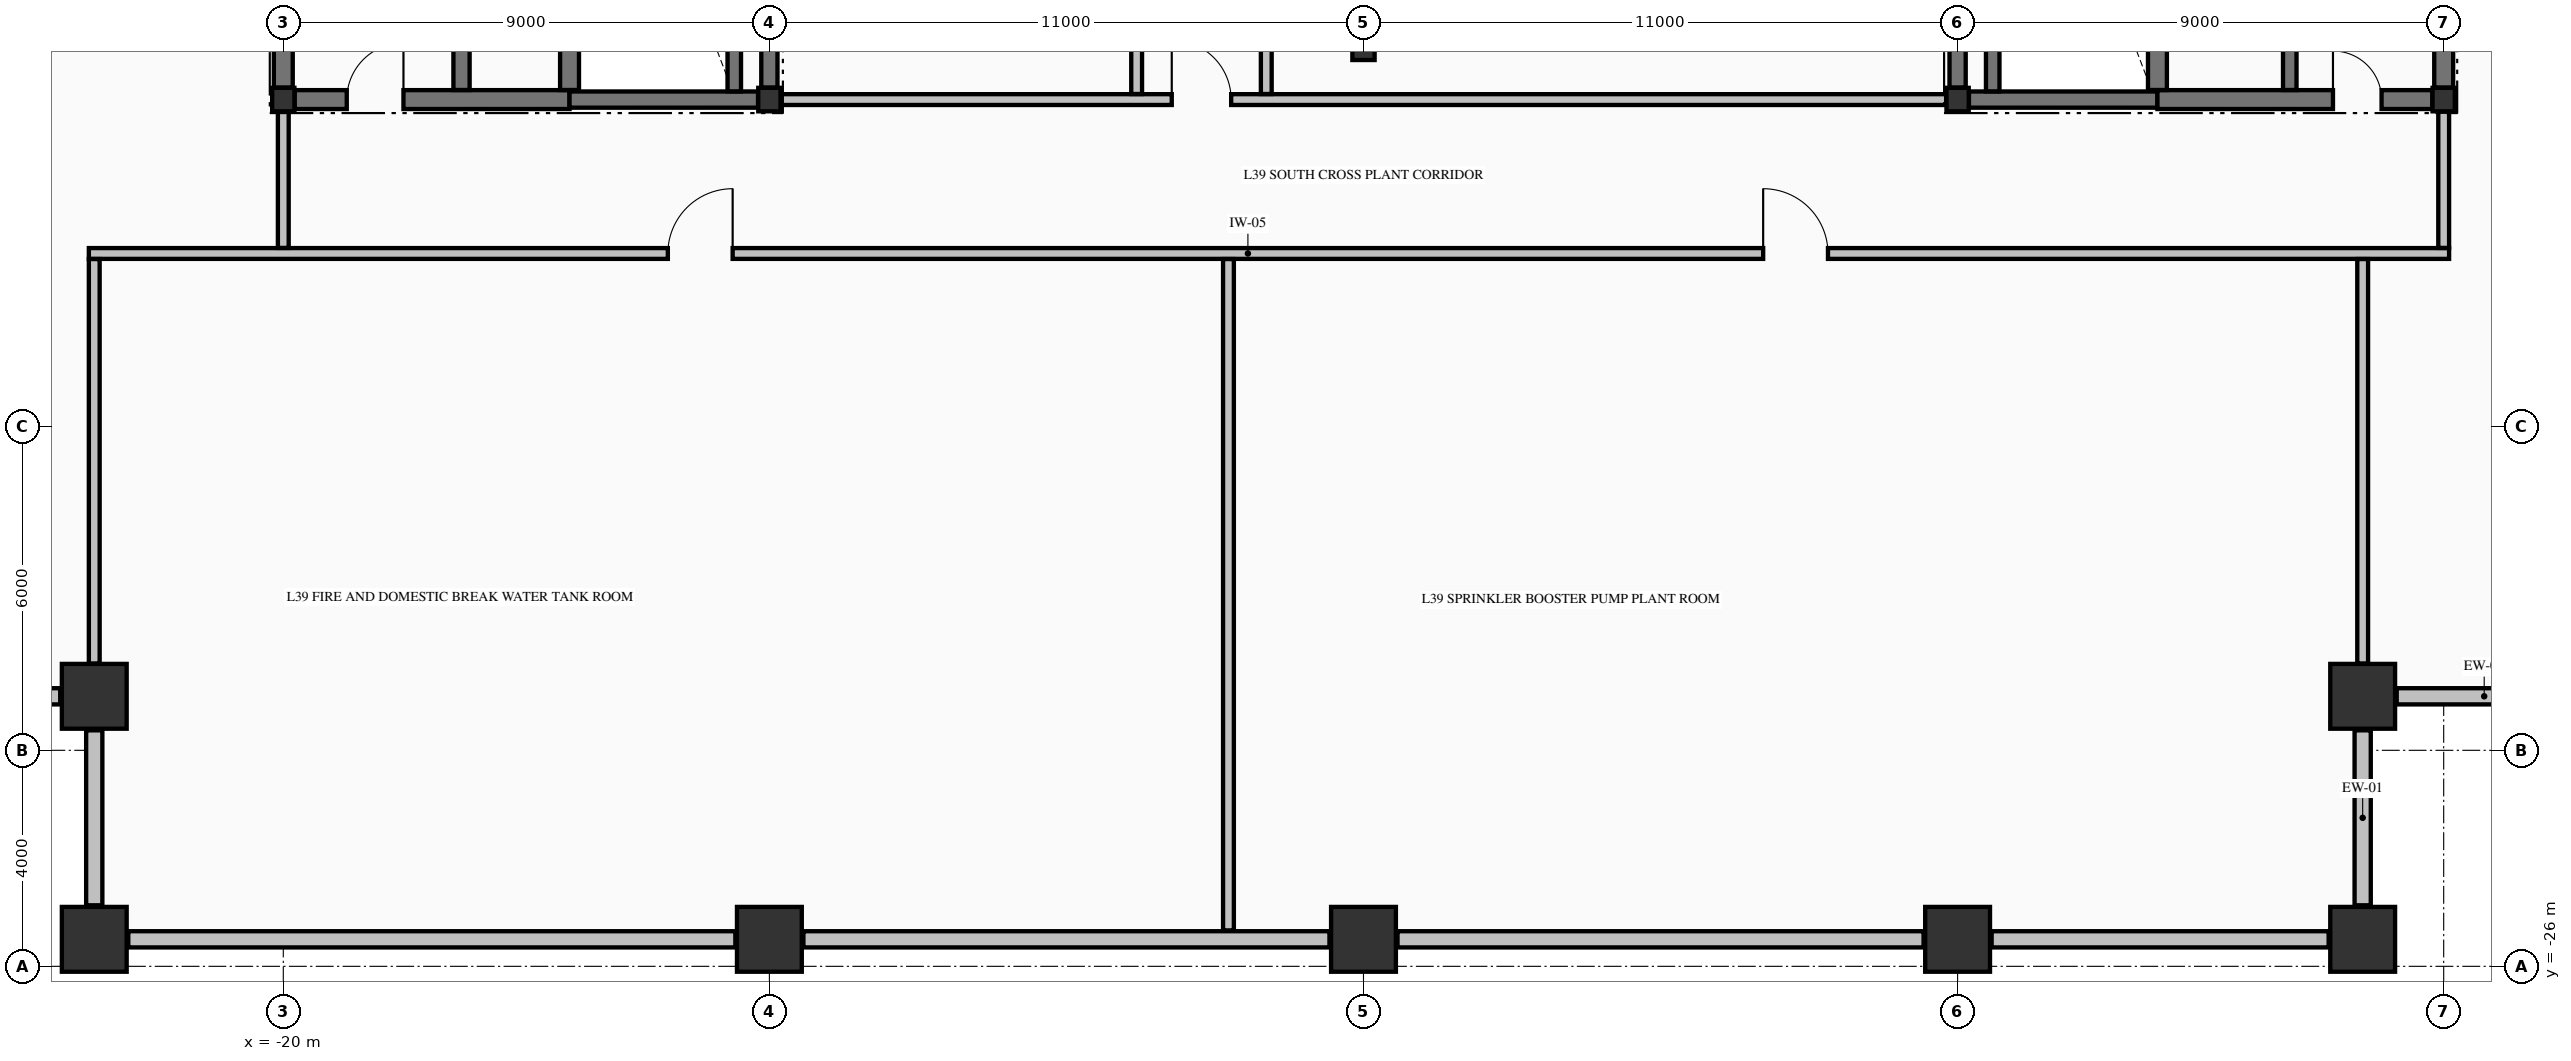
"""IFC4 building model, lengths in metres.
Left out: names, types, materials, properties, quantities, classifications, styles, units other than length and angle.
Written with IfcOpenShell. Run it as: python <this file> out.ifc"""

import sys

from ifc_helpers import new_model, si_unit, direction, frame, frame_2d, origin, origin_2d, place, context, subcontext, project, spatial, rectangle, i_section, extrude, element, fill, save


model = new_model("IFC4")
c1 = context("Model", 3, precision=1e-05, world=origin(), true_north=direction((0.0, 1.0)))
c2 = subcontext(c1, "Body", "Model", "MODEL_VIEW")
j1 = project(units=[si_unit("LENGTHUNIT", "METRE"), si_unit("PLANEANGLEUNIT", "RADIAN")], contexts=[c1])
p1 = place(None, origin())
s1 = spatial("IfcSite", under=j1, at=p1, CompositionType="ELEMENT")
p2 = place(p1, origin())
s2 = spatial("IfcBuilding", under=s1, at=p2, CompositionType="ELEMENT")
p3 = place(p2, frame((0.0, 0.0, 153.48)))
s3 = spatial("IfcBuildingStorey", under=s2, at=p3, CompositionType="ELEMENT", Elevation=153.48)
for number, where, z_axis, x_axis in (
    (1, (-23.5, -25.5, -0.425), (0.0, 0.0, 1.0), (1.0, 0.0, 0.0)),
    (2, (-11.0, -25.5, -0.425), (0.0, 0.0, 1.0), (1.0, 0.0, 0.0)),
    (3, (0.0, -25.5, -0.425), (0.0, 0.0, 1.0), (1.0, 0.0, 0.0)),
    (4, (11.0, -25.5, -0.425), (0.0, 0.0, 1.0), (1.0, 0.0, 0.0)),
    (5, (18.5, -25.5, -0.425), (0.0, 0.0, 1.0), (1.0, 0.0, 0.0)),
    (6, (-23.5, -21.0, -0.425), (0.0, 0.0, 1.0), (1.0, 0.0, 0.0)),
    (7, (18.5, -21.0, -0.425), (0.0, 0.0, 1.0), (1.0, 0.0, 0.0)),
):
    element("IfcColumn", number, at=place(p3, frame(where, z_axis=z_axis, x_axis=x_axis)), inside=s3, PredefinedType="COLUMN", context=c2, shape_type="SweptSolid", body=[
        extrude(rectangle(XDim=1.2, YDim=1.2, at=origin_2d()), origin(), (0.0, 0.0, 1.0), 4.76),
    ])
for number, where, z_axis, x_axis in (
    (8, (-20.0, -9.95, -0.425), (0.0, 0.0, 1.0), (1.0, 0.0, 0.0)),
    (9, (-11.0, -9.95, -0.425), (0.0, 0.0, 1.0), (1.0, 0.0, 0.0)),
    (10, (11.0, -9.95, -0.425), (0.0, 0.0, 1.0), (1.0, 0.0, 0.0)),
    (11, (20.0, -9.95, -0.425), (0.0, 0.0, 1.0), (1.0, 0.0, 0.0)),
    (12, (0.0, -9.0, -0.425), (0.0, 0.0, 1.0), (1.0, 0.0, 0.0)),
):
    element("IfcColumn", number, at=place(p3, frame(where, z_axis=z_axis, x_axis=x_axis)), inside=s3, PredefinedType="COLUMN", context=c2, shape_type="SweptSolid", body=[
        extrude(i_section(OverallWidth=0.412, OverallDepth=0.435, WebThickness=0.036, FlangeThickness=0.058, FilletRadius=0.015, at=origin_2d()), origin(), (0.0, 0.0, 1.0), 4.76),
    ])
p4 = place(p3, frame((18.5, -24.87, 0.0), z_axis=(0.0, 0.0, 1.0), x_axis=(0.0, 1.0, 0.0)))
e13 = element("IfcWall", 13, at=p4, inside=s3, PredefinedType="STANDARD", context=c2, shape_type="SweptSolid", body=[
    extrude(rectangle(XDim=3.24, YDim=0.3, at=frame_2d((1.62, 0.0))), origin(), (0.0, 0.0, 1.0), 2.527),
])
for number, where, z_axis, x_axis in (
    (14, (19.13, -21.0, 0.0), (0.0, 0.0, 1.0), (1.0, 0.0, 0.0)),
    (15, (-27.37, -21.0, 0.0), (0.0, 0.0, 1.0), (1.0, 0.0, 0.0)),
):
    element("IfcWall", number, at=place(p3, frame(where, z_axis=z_axis, x_axis=x_axis)), inside=s3, PredefinedType="STANDARD", context=c2, shape_type="SweptSolid", body=[
        extrude(rectangle(XDim=3.24, YDim=0.3, at=frame_2d((1.62, 0.0))), origin(), (0.0, 0.0, 1.0), 1.927),
    ])
p5 = place(p3, frame((-23.5, -21.63, 0.0), z_axis=(0.0, 0.0, 1.0), x_axis=(0.0, -1.0, 0.0)))
e16 = element("IfcWall", 16, at=p5, inside=s3, PredefinedType="STANDARD", context=c2, shape_type="SweptSolid", body=[
    extrude(rectangle(XDim=3.24, YDim=0.3, at=frame_2d((1.62, 0.0))), origin(), (0.0, 0.0, 1.0), 2.527),
])
p6 = place(p3, frame((-22.87, -25.5, 0.0), z_axis=(0.0, 0.0, 1.0), x_axis=(1.0, 0.0, 0.0)))
e17 = element("IfcWall", 17, at=p6, inside=s3, PredefinedType="STANDARD", context=c2, shape_type="SweptSolid", body=[
    extrude(rectangle(XDim=11.24, YDim=0.3, at=frame_2d((5.62, 0.0))), origin(), (0.0, 0.0, 1.0), 1.927),
])
for number, where, z_axis, x_axis in (
    (18, (-10.37, -25.5, 0.0), (0.0, 0.0, 1.0), (1.0, 0.0, 0.0)),
    (19, (0.63, -25.5, 0.0), (0.0, 0.0, 1.0), (1.0, 0.0, 0.0)),
):
    element("IfcWall", number, at=place(p3, frame(where, z_axis=z_axis, x_axis=x_axis)), inside=s3, PredefinedType="STANDARD", context=c2, shape_type="SweptSolid", body=[
        extrude(rectangle(XDim=9.74, YDim=0.3, at=frame_2d((4.87, 0.0))), origin(), (0.0, 0.0, 1.0), 1.927),
    ])
p7 = place(p3, frame((11.63, -25.5, 0.0), z_axis=(0.0, 0.0, 1.0), x_axis=(1.0, 0.0, 0.0)))
e20 = element("IfcWall", 20, at=p7, inside=s3, PredefinedType="STANDARD", context=c2, shape_type="SweptSolid", body=[
    extrude(rectangle(XDim=6.24, YDim=0.3, at=frame_2d((3.12, 0.0))), origin(), (0.0, 0.0, 1.0), 1.927),
])
p8 = place(p3, frame((-19.79, -9.95, 0.0), z_axis=(0.0, 0.0, 1.0), x_axis=(1.0, 0.0, 0.0)))
e21 = element("IfcWall", 21, at=p8, inside=s3, PredefinedType="SHEAR", context=c2, shape_type="SweptSolid", body=[
    extrude(rectangle(XDim=5.09, YDim=0.35, at=frame_2d((2.545, 0.0))), origin(), (0.0, 0.0, 1.0), 4.335),
])
p9 = place(p8, frame((0.965, 0.0, 0.0)))
e22 = element("IfcOpeningElement", 22, at=p9, cuts=e21, PredefinedType="OPENING", context=c2, shape_type="SweptSolid", body=[
    extrude(rectangle(XDim=1.05, YDim=2.15, at=frame_2d((0.525, 1.075))), frame((0.0, 0.185, 0.0), z_axis=(0.0, -1.0, 0.0), x_axis=(1.0, 0.0, 0.0)), (0.0, 0.0, 1.0), 0.37),
])
for number, where, z_axis, x_axis in (
    (23, (-14.7, -9.95, 0.0), (0.0, 0.0, 1.0), (1.0, 0.0, 0.0)),
    (24, (11.21, -9.95, 0.0), (0.0, 0.0, 1.0), (1.0, 0.0, 0.0)),
):
    element("IfcWall", number, at=place(p3, frame(where, z_axis=z_axis, x_axis=x_axis)), inside=s3, PredefinedType="SHEAR", context=c2, shape_type="SweptSolid", body=[
        extrude(rectangle(XDim=3.49, YDim=0.3, at=frame_2d((1.745, 0.0))), origin(), (0.0, 0.0, 1.0), 4.335),
    ])
p10 = place(p3, frame((14.7, -9.95, 0.0), z_axis=(0.0, 0.0, 1.0), x_axis=(1.0, 0.0, 0.0)))
e25 = element("IfcWall", 25, at=p10, inside=s3, PredefinedType="SHEAR", context=c2, shape_type="SweptSolid", body=[
    extrude(rectangle(XDim=5.09, YDim=0.35, at=frame_2d((2.545, 0.0))), origin(), (0.0, 0.0, 1.0), 4.335),
])
p11 = place(p10, frame((3.25, 0.0, 0.0)))
e26 = element("IfcOpeningElement", 26, at=p11, cuts=e25, PredefinedType="OPENING", context=c2, shape_type="SweptSolid", body=[
    extrude(rectangle(XDim=0.9, YDim=2.15, at=frame_2d((0.45, 1.075))), frame((0.0, 0.185, 0.0), z_axis=(0.0, -1.0, 0.0), x_axis=(1.0, 0.0, 0.0)), (0.0, 0.0, 1.0), 0.37),
])
p12 = place(p3, frame((-23.6, -12.8, 0.0), z_axis=(0.0, 0.0, 1.0), x_axis=(1.0, 0.0, 0.0)))
e27 = element("IfcWall", 27, at=p12, inside=s3, PredefinedType="PARTITIONING", context=c2, shape_type="SweptSolid", body=[
    extrude(rectangle(XDim=43.7, YDim=0.2, at=frame_2d((21.85, 0.0))), origin(), (0.0, 0.0, 1.0), 4.335),
])
p13 = place(p12, frame((10.72, 0.0, 0.0)))
e28 = element("IfcOpeningElement", 28, at=p13, cuts=e27, PredefinedType="OPENING", context=c2, shape_type="SweptSolid", body=[
    extrude(rectangle(XDim=1.2, YDim=2.15, at=frame_2d((0.6, 1.075))), frame((0.0, 0.11, 0.0), z_axis=(0.0, -1.0, 0.0), x_axis=(1.0, 0.0, 0.0)), (0.0, 0.0, 1.0), 0.22),
])
p14 = place(p12, frame((31.0, 0.0, 0.0)))
e29 = element("IfcOpeningElement", 29, at=p14, cuts=e27, PredefinedType="OPENING", context=c2, shape_type="SweptSolid", body=[
    extrude(rectangle(XDim=1.2, YDim=2.15, at=frame_2d((0.6, 1.075))), frame((0.0, 0.11, 0.0), z_axis=(0.0, -1.0, 0.0), x_axis=(1.0, 0.0, 0.0)), (0.0, 0.0, 1.0), 0.22),
])
p15 = place(p3, frame((-10.788, -9.95, 0.0), z_axis=(0.0, 0.0, 1.0), x_axis=(1.0, 0.0, 0.0)))
e30 = element("IfcWall", 30, at=p15, inside=s3, PredefinedType="PARTITIONING", context=c2, shape_type="SweptSolid", body=[
    extrude(rectangle(XDim=21.576, YDim=0.2, at=frame_2d((10.788, 0.0))), origin(), (0.0, 0.0, 1.0), 4.335),
])
p16 = place(p15, frame((7.238, 0.0, 0.0)))
e31 = element("IfcOpeningElement", 31, at=p16, cuts=e30, PredefinedType="OPENING", context=c2, shape_type="SweptSolid", body=[
    extrude(rectangle(XDim=1.1, YDim=2.15, at=frame_2d((0.55, 1.075))), frame((0.0, 0.11, 0.0), z_axis=(0.0, -1.0, 0.0), x_axis=(1.0, 0.0, 0.0)), (0.0, 0.0, 1.0), 0.22),
])
p17 = place(p3, frame((-20.0, -9.729, 0.0), z_axis=(0.0, 0.0, 1.0), x_axis=(0.0, 1.0, 0.0)))
e32 = element("IfcWall", 32, at=p17, inside=s3, PredefinedType="SHEAR", context=c2, shape_type="SweptSolid", body=[
    extrude(rectangle(XDim=9.507, YDim=0.35, at=frame_2d((4.753, 0.0))), origin(), (0.0, 0.0, 1.0), 4.335),
])
p18 = place(p3, frame((-16.7, -9.773, 0.0), z_axis=(0.0, 0.0, 1.0), x_axis=(0.0, 1.0, 0.0)))
e33 = element("IfcWall", 33, at=p18, inside=s3, PredefinedType="SHEAR", context=c2, shape_type="SweptSolid", body=[
    extrude(rectangle(XDim=9.371, YDim=0.3, at=frame_2d((4.686, 0.0))), origin(), (0.0, 0.0, 1.0), 4.335),
])
p19 = place(p3, frame((-14.7, -9.773, 0.0), z_axis=(0.0, 0.0, 1.0), x_axis=(0.0, 1.0, 0.0)))
e34 = element("IfcWall", 34, at=p19, inside=s3, PredefinedType="SHEAR", context=c2, shape_type="SweptSolid", body=[
    extrude(rectangle(XDim=9.371, YDim=0.35, at=frame_2d((4.686, 0.0))), origin(), (0.0, 0.0, 1.0), 4.335),
])
p20 = place(p3, frame((-11.65, -9.798, 0.0), z_axis=(0.0, 0.0, 1.0), x_axis=(0.0, 1.0, 0.0)))
e35 = element("IfcWall", 35, at=p20, inside=s3, PredefinedType="SOLIDWALL", context=c2, shape_type="SweptSolid", body=[
    extrude(rectangle(XDim=9.396, YDim=0.25, at=frame_2d((4.698, 0.0))), origin(), (0.0, 0.0, 1.0), 4.335),
])
for number, where, z_axis, x_axis in (
    (36, (-11.0, -9.729, 0.0), (0.0, 0.0, 1.0), (0.0, 1.0, 0.0)),
    (37, (11.0, -9.729, 0.0), (0.0, 0.0, 1.0), (0.0, 1.0, 0.0)),
):
    element("IfcWall", number, at=place(p3, frame(where, z_axis=z_axis, x_axis=x_axis)), inside=s3, PredefinedType="SHEAR", context=c2, shape_type="SweptSolid", body=[
        extrude(rectangle(XDim=9.507, YDim=0.3, at=frame_2d((4.753, 0.0))), origin(), (0.0, 0.0, 1.0), 4.335),
    ])
p21 = place(p3, frame((11.65, -9.798, 0.0), z_axis=(0.0, 0.0, 1.0), x_axis=(0.0, 1.0, 0.0)))
e38 = element("IfcWall", 38, at=p21, inside=s3, PredefinedType="SOLIDWALL", context=c2, shape_type="SweptSolid", body=[
    extrude(rectangle(XDim=9.396, YDim=0.25, at=frame_2d((4.698, 0.0))), origin(), (0.0, 0.0, 1.0), 4.335),
])
p22 = place(p3, frame((14.7, -9.773, 0.0), z_axis=(0.0, 0.0, 1.0), x_axis=(0.0, 1.0, 0.0)))
e39 = element("IfcWall", 39, at=p22, inside=s3, PredefinedType="SHEAR", context=c2, shape_type="SweptSolid", body=[
    extrude(rectangle(XDim=9.371, YDim=0.35, at=frame_2d((4.686, 0.0))), origin(), (0.0, 0.0, 1.0), 4.335),
])
p23 = place(p3, frame((17.15, -9.773, 0.0), z_axis=(0.0, 0.0, 1.0), x_axis=(0.0, 1.0, 0.0)))
e40 = element("IfcWall", 40, at=p23, inside=s3, PredefinedType="SOLIDWALL", context=c2, shape_type="SweptSolid", body=[
    extrude(rectangle(XDim=2.596, YDim=0.25, at=frame_2d((1.298, 0.0))), origin(), (0.0, 0.0, 1.0), 4.335),
])
p24 = place(p3, frame((20.0, -9.729, 0.0), z_axis=(0.0, 0.0, 1.0), x_axis=(0.0, 1.0, 0.0)))
e41 = element("IfcWall", 41, at=p24, inside=s3, PredefinedType="SHEAR", context=c2, shape_type="SweptSolid", body=[
    extrude(rectangle(XDim=2.552, YDim=0.35, at=frame_2d((1.276, 0.0))), origin(), (0.0, 0.0, 1.0), 4.335),
])
p25 = place(p3, frame((-23.5, -20.394, 0.0), z_axis=(0.0, 0.0, 1.0), x_axis=(0.0, 1.0, 0.0)))
e42 = element("IfcWall", 42, at=p25, inside=s3, PredefinedType="PARTITIONING", context=c2, shape_type="SweptSolid", body=[
    extrude(rectangle(XDim=7.491, YDim=0.2, at=frame_2d((3.746, 0.0))), origin(), (0.0, 0.0, 1.0), 4.335),
])
p26 = place(p3, frame((-20.0, -12.697, 0.0), z_axis=(0.0, 0.0, 1.0), x_axis=(0.0, 1.0, 0.0)))
e43 = element("IfcWall", 43, at=p26, inside=s3, PredefinedType="PARTITIONING", context=c2, shape_type="SweptSolid", body=[
    extrude(rectangle(XDim=2.523, YDim=0.2, at=frame_2d((1.262, 0.0))), origin(), (0.0, 0.0, 1.0), 1.927),
])
p27 = place(p3, frame((-4.2, -9.847, 0.0), z_axis=(0.0, 0.0, 1.0), x_axis=(0.0, 1.0, 0.0)))
e44 = element("IfcWall", 44, at=p27, inside=s3, PredefinedType="PARTITIONING", context=c2, shape_type="SweptSolid", body=[
    extrude(rectangle(XDim=10.344, YDim=0.2, at=frame_2d((5.172, 0.0))), origin(), (0.0, 0.0, 1.0), 4.335),
])
p28 = place(p3, frame((-2.5, -25.335, 0.0), z_axis=(0.0, 0.0, 1.0), x_axis=(0.0, 1.0, 0.0)))
e45 = element("IfcWall", 45, at=p28, inside=s3, PredefinedType="PARTITIONING", context=c2, shape_type="SweptSolid", body=[
    extrude(rectangle(XDim=12.432, YDim=0.2, at=frame_2d((6.216, 0.0))), origin(), (0.0, 0.0, 1.0), 4.335),
])
p29 = place(p3, frame((-1.8, -9.847, 0.0), z_axis=(0.0, 0.0, 1.0), x_axis=(0.0, 1.0, 0.0)))
e46 = element("IfcWall", 46, at=p29, inside=s3, PredefinedType="PARTITIONING", context=c2, shape_type="SweptSolid", body=[
    extrude(rectangle(XDim=10.344, YDim=0.2, at=frame_2d((5.172, 0.0))), origin(), (0.0, 0.0, 1.0), 4.335),
])
p30 = place(p3, frame((18.5, -20.394, 0.0), z_axis=(0.0, 0.0, 1.0), x_axis=(0.0, 1.0, 0.0)))
e47 = element("IfcWall", 47, at=p30, inside=s3, PredefinedType="PARTITIONING", context=c2, shape_type="SweptSolid", body=[
    extrude(rectangle(XDim=7.491, YDim=0.2, at=frame_2d((3.746, 0.0))), origin(), (0.0, 0.0, 1.0), 4.335),
])
p31 = place(p3, frame((20.0, -12.697, 0.0), z_axis=(0.0, 0.0, 1.0), x_axis=(0.0, 1.0, 0.0)))
e48 = element("IfcWall", 48, at=p31, inside=s3, PredefinedType="PARTITIONING", context=c2, shape_type="SweptSolid", body=[
    extrude(rectangle(XDim=2.523, YDim=0.2, at=frame_2d((1.262, 0.0))), origin(), (0.0, 0.0, 1.0), 1.927),
])
p32 = place(p9, origin())
e49 = element("IfcDoor", 49, at=p32, inside=s3, OperationType="SINGLE_SWING_RIGHT", PredefinedType="DOOR", context=c2, shape_type="SweptSolid", body=[
    extrude(rectangle(XDim=1.05, YDim=2.15, at=frame_2d((0.525, 1.075))), frame((0.0, 0.025, 0.0), z_axis=(0.0, -1.0, 0.0), x_axis=(1.0, 0.0, 0.0)), (0.0, 0.0, 1.0), 0.05),
])
fill(e22, e49)
p33 = place(p11, origin())
e50 = element("IfcDoor", 50, at=p33, inside=s3, OperationType="SINGLE_SWING_LEFT", PredefinedType="DOOR", context=c2, shape_type="SweptSolid", body=[
    extrude(rectangle(XDim=0.9, YDim=2.15, at=frame_2d((0.45, 1.075))), frame((0.0, 0.025, 0.0), z_axis=(0.0, -1.0, 0.0), x_axis=(1.0, 0.0, 0.0)), (0.0, 0.0, 1.0), 0.05),
])
fill(e26, e50)
p34 = place(p16, origin())
e51 = element("IfcDoor", 51, at=p34, inside=s3, OperationType="SINGLE_SWING_LEFT", PredefinedType="DOOR", context=c2, shape_type="SweptSolid", body=[
    extrude(rectangle(XDim=1.1, YDim=2.15, at=frame_2d((0.55, 1.075))), frame((0.0, 0.025, 0.0), z_axis=(0.0, -1.0, 0.0), x_axis=(1.0, 0.0, 0.0)), (0.0, 0.0, 1.0), 0.05),
])
fill(e31, e51)
p35 = place(p13, origin())
e52 = element("IfcDoor", 52, at=p35, inside=s3, OperationType="SINGLE_SWING_RIGHT", PredefinedType="DOOR", context=c2, shape_type="SweptSolid", body=[
    extrude(rectangle(XDim=1.2, YDim=2.15, at=frame_2d((0.6, 1.075))), frame((0.0, 0.025, 0.0), z_axis=(0.0, -1.0, 0.0), x_axis=(1.0, 0.0, 0.0)), (0.0, 0.0, 1.0), 0.05),
])
fill(e28, e52)
p36 = place(p14, origin())
e53 = element("IfcDoor", 53, at=p36, inside=s3, OperationType="SINGLE_SWING_LEFT", PredefinedType="DOOR", context=c2, shape_type="SweptSolid", body=[
    extrude(rectangle(XDim=1.2, YDim=2.15, at=frame_2d((0.6, 1.075))), frame((0.0, 0.025, 0.0), z_axis=(0.0, -1.0, 0.0), x_axis=(1.0, 0.0, 0.0)), (0.0, 0.0, 1.0), 0.05),
])
fill(e29, e53)
save(model, sys.argv[1])
